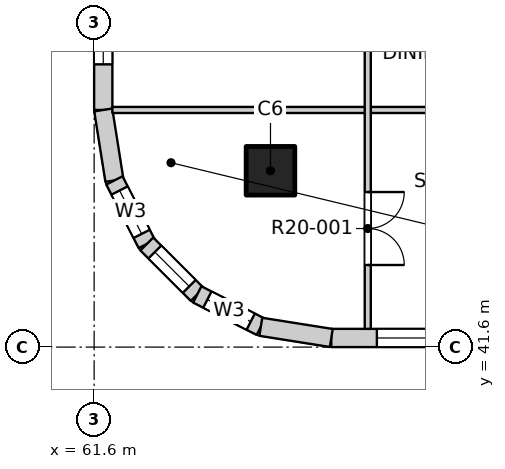
"""IFC4 building model, lengths in metres.
Left out: names, types, materials, properties, quantities, classifications, styles, units other than length and angle.
Written with IfcOpenShell. Run it as: python <this file> out.ifc"""

import sys

from ifc_helpers import new_model, si_unit, direction, frame, frame_2d, origin, origin_2d, place, context, subcontext, project, spatial, rectangle, extrude, element, fill, save


model = new_model("IFC4")
c1 = context("Model", 3, precision=1e-05, world=origin(), true_north=direction((0.0, 1.0)))
c2 = subcontext(c1, "Body", "Model", "MODEL_VIEW")
j1 = project(units=[si_unit("LENGTHUNIT", "METRE"), si_unit("PLANEANGLEUNIT", "RADIAN")], contexts=[c1])
p1 = place(None, origin())
s1 = spatial("IfcSite", under=j1, at=p1, CompositionType="ELEMENT")
p2 = place(p1, origin())
s2 = spatial("IfcBuilding", under=s1, at=p2, CompositionType="ELEMENT")
p3 = place(p2, frame((0.0, 0.0, 210.9)))
s3 = spatial("IfcBuildingStorey", under=s2, at=p3, CompositionType="ELEMENT", Elevation=210.9)
p4 = place(p3, frame((64.5, 44.5, -0.25), z_axis=(0.0, 0.0, 1.0), x_axis=(1.0, 0.0, 0.0)))
e1 = element("IfcColumn", 1, at=p4, inside=s3, PredefinedType="COLUMN", context=c2, shape_type="SweptSolid", body=[
    extrude(rectangle(XDim=0.8, YDim=0.8, at=origin_2d()), origin(), (0.0, 0.0, 1.0), 3.4),
])
p5 = place(p3, frame((65.5, 41.75, 0.0), z_axis=(0.0, 0.0, 1.0), x_axis=(1.0, 0.0, 0.0)))
e2 = element("IfcWall", 2, at=p5, inside=s3, PredefinedType="SOLIDWALL", context=c2, shape_type="SweptSolid", body=[
    extrude(rectangle(XDim=7.4, YDim=0.3, at=frame_2d((3.7, 0.0))), origin(), (0.0, 0.0, 1.0), 2.7),
])
p6 = place(p5, frame((0.75, 0.0, 0.9)))
e3 = element("IfcOpeningElement", 3, at=p6, cuts=e2, PredefinedType="OPENING", context=c2, shape_type="SweptSolid", body=[
    extrude(rectangle(XDim=2.4, YDim=1.8, at=frame_2d((1.2, 0.9))), frame((0.0, 0.16, 0.0), z_axis=(0.0, -1.0, 0.0), x_axis=(1.0, 0.0, 0.0)), (0.0, 0.0, 1.0), 0.32),
])
p7 = place(p5, frame((4.65, 0.0, 0.9)))
e4 = element("IfcOpeningElement", 4, at=p7, cuts=e2, PredefinedType="OPENING", context=c2, shape_type="SweptSolid", body=[
    extrude(rectangle(XDim=2.4, YDim=1.8, at=frame_2d((1.2, 0.9))), frame((0.0, 0.16, 0.0), z_axis=(0.0, -1.0, 0.0), x_axis=(1.0, 0.0, 0.0)), (0.0, 0.0, 1.0), 0.32),
])
p8 = place(p3, frame((61.75, 45.5, 0.0), z_axis=(0.0, 0.0, 1.0), x_axis=(0.0, 1.0, 0.0)))
e5 = element("IfcWall", 5, at=p8, inside=s3, PredefinedType="SOLIDWALL", context=c2, shape_type="SweptSolid", body=[
    extrude(rectangle(XDim=7.4, YDim=0.3, at=frame_2d((3.7, 0.0))), origin(), (0.0, 0.0, 1.0), 2.7),
])
p9 = place(p8, frame((0.75, 0.0, 0.9)))
e6 = element("IfcOpeningElement", 6, at=p9, cuts=e5, PredefinedType="OPENING", context=c2, shape_type="SweptSolid", body=[
    extrude(rectangle(XDim=2.4, YDim=1.8, at=frame_2d((1.2, 0.9))), frame((0.0, 0.16, 0.0), z_axis=(0.0, -1.0, 0.0), x_axis=(1.0, 0.0, 0.0)), (0.0, 0.0, 1.0), 0.32),
])
p10 = place(p8, frame((4.65, 0.0, 0.9)))
e7 = element("IfcOpeningElement", 7, at=p10, cuts=e5, PredefinedType="OPENING", context=c2, shape_type="SweptSolid", body=[
    extrude(rectangle(XDim=2.4, YDim=1.8, at=frame_2d((1.2, 0.9))), frame((0.0, 0.16, 0.0), z_axis=(0.0, -1.0, 0.0), x_axis=(1.0, 0.0, 0.0)), (0.0, 0.0, 1.0), 0.32),
])
p11 = place(p3, frame((61.75, 45.5, 0.0), z_axis=(0.0, 0.0, 1.0), x_axis=(0.156496880861, -0.987678452879, 0.0)))
e8 = element("IfcWall", 8, at=p11, inside=s3, PredefinedType="SOLIDWALL", context=c2, shape_type="SweptSolid", body=[
    extrude(rectangle(XDim=1.173, YDim=0.3, at=frame_2d((0.586, 0.0))), origin(), (0.0, 0.0, 1.0), 2.7),
])
p12 = place(p3, frame((61.934, 44.341, 0.0), z_axis=(0.0, 0.0, 1.0), x_axis=(0.454025524128, -0.890988677504, 0.0)))
e9 = element("IfcWall", 9, at=p12, inside=s3, PredefinedType="SOLIDWALL", context=c2, shape_type="SweptSolid", body=[
    extrude(rectangle(XDim=1.173, YDim=0.3, at=frame_2d((0.587, 0.0))), origin(), (0.0, 0.0, 1.0), 2.7),
])
p13 = place(p12, frame((0.187, 0.0, 0.9)))
e10 = element("IfcOpeningElement", 10, at=p13, cuts=e9, PredefinedType="OPENING", context=c2, shape_type="SweptSolid", body=[
    extrude(rectangle(XDim=0.8, YDim=1.2, at=frame_2d((0.4, 0.6))), frame((0.0, 0.16, 0.0), z_axis=(0.0, -1.0, 0.0), x_axis=(1.0, 0.0, 0.0)), (0.0, 0.0, 1.0), 0.32),
])
p14 = place(p3, frame((62.466, 43.296, 0.0), z_axis=(0.0, 0.0, 1.0), x_axis=(0.707106781187, -0.707106781187, 0.0)))
e11 = element("IfcWall", 11, at=p14, inside=s3, PredefinedType="SOLIDWALL", context=c2, shape_type="SweptSolid", body=[
    extrude(rectangle(XDim=1.173, YDim=0.3, at=frame_2d((0.586, 0.0))), origin(), (0.0, 0.0, 1.0), 2.7),
])
p15 = place(p14, frame((0.187, 0.0, 0.9)))
e12 = element("IfcOpeningElement", 12, at=p15, cuts=e11, PredefinedType="OPENING", context=c2, shape_type="SweptSolid", body=[
    extrude(rectangle(XDim=0.8, YDim=1.2, at=frame_2d((0.4, 0.6))), frame((0.0, 0.16, 0.0), z_axis=(0.0, -1.0, 0.0), x_axis=(1.0, 0.0, 0.0)), (0.0, 0.0, 1.0), 0.32),
])
p16 = place(p3, frame((63.296, 42.466, 0.0), z_axis=(0.0, 0.0, 1.0), x_axis=(0.890988677504, -0.454025524128, 0.0)))
e13 = element("IfcWall", 13, at=p16, inside=s3, PredefinedType="SOLIDWALL", context=c2, shape_type="SweptSolid", body=[
    extrude(rectangle(XDim=1.173, YDim=0.3, at=frame_2d((0.587, 0.0))), origin(), (0.0, 0.0, 1.0), 2.7),
])
p17 = place(p16, frame((0.187, 0.0, 0.9)))
e14 = element("IfcOpeningElement", 14, at=p17, cuts=e13, PredefinedType="OPENING", context=c2, shape_type="SweptSolid", body=[
    extrude(rectangle(XDim=0.8, YDim=1.2, at=frame_2d((0.4, 0.6))), frame((0.0, 0.16, 0.0), z_axis=(0.0, -1.0, 0.0), x_axis=(1.0, 0.0, 0.0)), (0.0, 0.0, 1.0), 0.32),
])
p18 = place(p3, frame((64.341, 41.934, 0.0), z_axis=(0.0, 0.0, 1.0), x_axis=(0.987678452879, -0.156496880861, 0.0)))
e15 = element("IfcWall", 15, at=p18, inside=s3, PredefinedType="SOLIDWALL", context=c2, shape_type="SweptSolid", body=[
    extrude(rectangle(XDim=1.173, YDim=0.3, at=frame_2d((0.586, 0.0))), origin(), (0.0, 0.0, 1.0), 2.7),
])
p19 = place(p3, frame((61.9, 45.5, 0.0), z_axis=(0.0, 0.0, 1.0), x_axis=(1.0, 0.0, 0.0)))
e16 = element("IfcWall", 16, at=p19, inside=s3, PredefinedType="PARTITIONING", context=c2, shape_type="SweptSolid", body=[
    extrude(rectangle(XDim=11.475, YDim=0.1, at=frame_2d((5.737, 0.0))), origin(), (0.0, 0.0, 1.0), 3.15),
])
p20 = place(p19, frame((7.965, 0.0, 0.0)))
e17 = element("IfcOpeningElement", 17, at=p20, cuts=e16, PredefinedType="OPENING", context=c2, shape_type="SweptSolid", body=[
    extrude(rectangle(XDim=0.9, YDim=2.1, at=frame_2d((0.45, 1.05))), frame((0.0, 0.06, 0.0), z_axis=(0.0, -1.0, 0.0), x_axis=(1.0, 0.0, 0.0)), (0.0, 0.0, 1.0), 0.12),
])
p21 = place(p3, frame((66.1, 41.9, 0.0), z_axis=(0.0, 0.0, 1.0), x_axis=(0.0, 1.0, 0.0)))
e18 = element("IfcWall", 18, at=p21, inside=s3, PredefinedType="PARTITIONING", context=c2, shape_type="SweptSolid", body=[
    extrude(rectangle(XDim=19.1, YDim=0.1, at=frame_2d((9.55, 0.0))), origin(), (0.0, 0.0, 1.0), 3.15),
])
p22 = place(p21, frame((1.05, 0.0, 0.0)))
e19 = element("IfcOpeningElement", 19, at=p22, cuts=e18, PredefinedType="OPENING", context=c2, shape_type="SweptSolid", body=[
    extrude(rectangle(XDim=1.2, YDim=2.1, at=frame_2d((0.6, 1.05))), frame((0.0, 0.06, 0.0), z_axis=(0.0, -1.0, 0.0), x_axis=(1.0, 0.0, 0.0)), (0.0, 0.0, 1.0), 0.12),
])
p23 = place(p21, frame((4.95, 0.0, 0.0)))
e20 = element("IfcOpeningElement", 20, at=p23, cuts=e18, PredefinedType="OPENING", context=c2, shape_type="SweptSolid", body=[
    extrude(rectangle(XDim=1.2, YDim=2.1, at=frame_2d((0.6, 1.05))), frame((0.0, 0.06, 0.0), z_axis=(0.0, -1.0, 0.0), x_axis=(1.0, 0.0, 0.0)), (0.0, 0.0, 1.0), 0.12),
])
p24 = place(p21, frame((8.025, 0.0, 0.0)))
e21 = element("IfcOpeningElement", 21, at=p24, cuts=e18, PredefinedType="OPENING", context=c2, shape_type="SweptSolid", body=[
    extrude(rectangle(XDim=0.9, YDim=2.1, at=frame_2d((0.45, 1.05))), frame((0.0, 0.06, 0.0), z_axis=(0.0, -1.0, 0.0), x_axis=(1.0, 0.0, 0.0)), (0.0, 0.0, 1.0), 0.12),
])
p25 = place(p21, frame((9.975, 0.0, 0.0)))
e22 = element("IfcOpeningElement", 22, at=p25, cuts=e18, PredefinedType="OPENING", context=c2, shape_type="SweptSolid", body=[
    extrude(rectangle(XDim=0.9, YDim=2.1, at=frame_2d((0.45, 1.05))), frame((0.0, 0.06, 0.0), z_axis=(0.0, -1.0, 0.0), x_axis=(1.0, 0.0, 0.0)), (0.0, 0.0, 1.0), 0.12),
])
p26 = place(p21, frame((12.75, 0.0, 0.0)))
e23 = element("IfcOpeningElement", 23, at=p26, cuts=e18, PredefinedType="OPENING", context=c2, shape_type="SweptSolid", body=[
    extrude(rectangle(XDim=1.2, YDim=2.1, at=frame_2d((0.6, 1.05))), frame((0.0, 0.06, 0.0), z_axis=(0.0, -1.0, 0.0), x_axis=(1.0, 0.0, 0.0)), (0.0, 0.0, 1.0), 0.12),
])
p27 = place(p21, frame((15.825, 0.0, 0.0)))
e24 = element("IfcOpeningElement", 24, at=p27, cuts=e18, PredefinedType="OPENING", context=c2, shape_type="SweptSolid", body=[
    extrude(rectangle(XDim=0.9, YDim=2.1, at=frame_2d((0.45, 1.05))), frame((0.0, 0.06, 0.0), z_axis=(0.0, -1.0, 0.0), x_axis=(1.0, 0.0, 0.0)), (0.0, 0.0, 1.0), 0.12),
])
p28 = place(p21, frame((17.775, 0.0, 0.0)))
e25 = element("IfcOpeningElement", 25, at=p28, cuts=e18, PredefinedType="OPENING", context=c2, shape_type="SweptSolid", body=[
    extrude(rectangle(XDim=0.9, YDim=2.1, at=frame_2d((0.45, 1.05))), frame((0.0, 0.06, 0.0), z_axis=(0.0, -1.0, 0.0), x_axis=(1.0, 0.0, 0.0)), (0.0, 0.0, 1.0), 0.12),
])
p29 = place(p6, origin())
e26 = element("IfcWindow", 26, at=p29, inside=s3, PartitioningType="DOUBLE_PANEL_VERTICAL", PredefinedType="WINDOW", context=c2, shape_type="SweptSolid", body=[
    extrude(rectangle(XDim=2.4, YDim=1.8, at=frame_2d((1.2, 0.9))), frame((0.0, 0.03, 0.0), z_axis=(0.0, -1.0, 0.0), x_axis=(1.0, 0.0, 0.0)), (0.0, 0.0, 1.0), 0.06),
])
fill(e3, e26)
p30 = place(p9, origin())
e27 = element("IfcWindow", 27, at=p30, inside=s3, PartitioningType="DOUBLE_PANEL_VERTICAL", PredefinedType="WINDOW", context=c2, shape_type="SweptSolid", body=[
    extrude(rectangle(XDim=2.4, YDim=1.8, at=frame_2d((1.2, 0.9))), frame((0.0, 0.03, 0.0), z_axis=(0.0, -1.0, 0.0), x_axis=(1.0, 0.0, 0.0)), (0.0, 0.0, 1.0), 0.06),
])
fill(e6, e27)
p31 = place(p13, origin())
e28 = element("IfcWindow", 28, at=p31, inside=s3, PartitioningType="SINGLE_PANEL", PredefinedType="WINDOW", context=c2, shape_type="SweptSolid", body=[
    extrude(rectangle(XDim=0.8, YDim=1.2, at=frame_2d((0.4, 0.6))), frame((0.0, 0.03, 0.0), z_axis=(0.0, -1.0, 0.0), x_axis=(1.0, 0.0, 0.0)), (0.0, 0.0, 1.0), 0.06),
])
fill(e10, e28)
p32 = place(p15, origin())
e29 = element("IfcWindow", 29, at=p32, inside=s3, PartitioningType="SINGLE_PANEL", PredefinedType="WINDOW", context=c2, shape_type="SweptSolid", body=[
    extrude(rectangle(XDim=0.8, YDim=1.2, at=frame_2d((0.4, 0.6))), frame((0.0, 0.03, 0.0), z_axis=(0.0, -1.0, 0.0), x_axis=(1.0, 0.0, 0.0)), (0.0, 0.0, 1.0), 0.06),
])
fill(e12, e29)
p33 = place(p17, origin())
e30 = element("IfcWindow", 30, at=p33, inside=s3, PartitioningType="SINGLE_PANEL", PredefinedType="WINDOW", context=c2, shape_type="SweptSolid", body=[
    extrude(rectangle(XDim=0.8, YDim=1.2, at=frame_2d((0.4, 0.6))), frame((0.0, 0.03, 0.0), z_axis=(0.0, -1.0, 0.0), x_axis=(1.0, 0.0, 0.0)), (0.0, 0.0, 1.0), 0.06),
])
fill(e14, e30)
p34 = place(p22, origin())
e31 = element("IfcDoor", 31, at=p34, inside=s3, OperationType="DOUBLE_DOOR_SINGLE_SWING", PredefinedType="DOOR", context=c2, shape_type="SweptSolid", body=[
    extrude(rectangle(XDim=1.2, YDim=2.1, at=frame_2d((0.6, 1.05))), frame((0.0, 0.025, 0.0), z_axis=(0.0, -1.0, 0.0), x_axis=(1.0, 0.0, 0.0)), (0.0, 0.0, 1.0), 0.05),
])
fill(e19, e31)
save(model, sys.argv[1])
